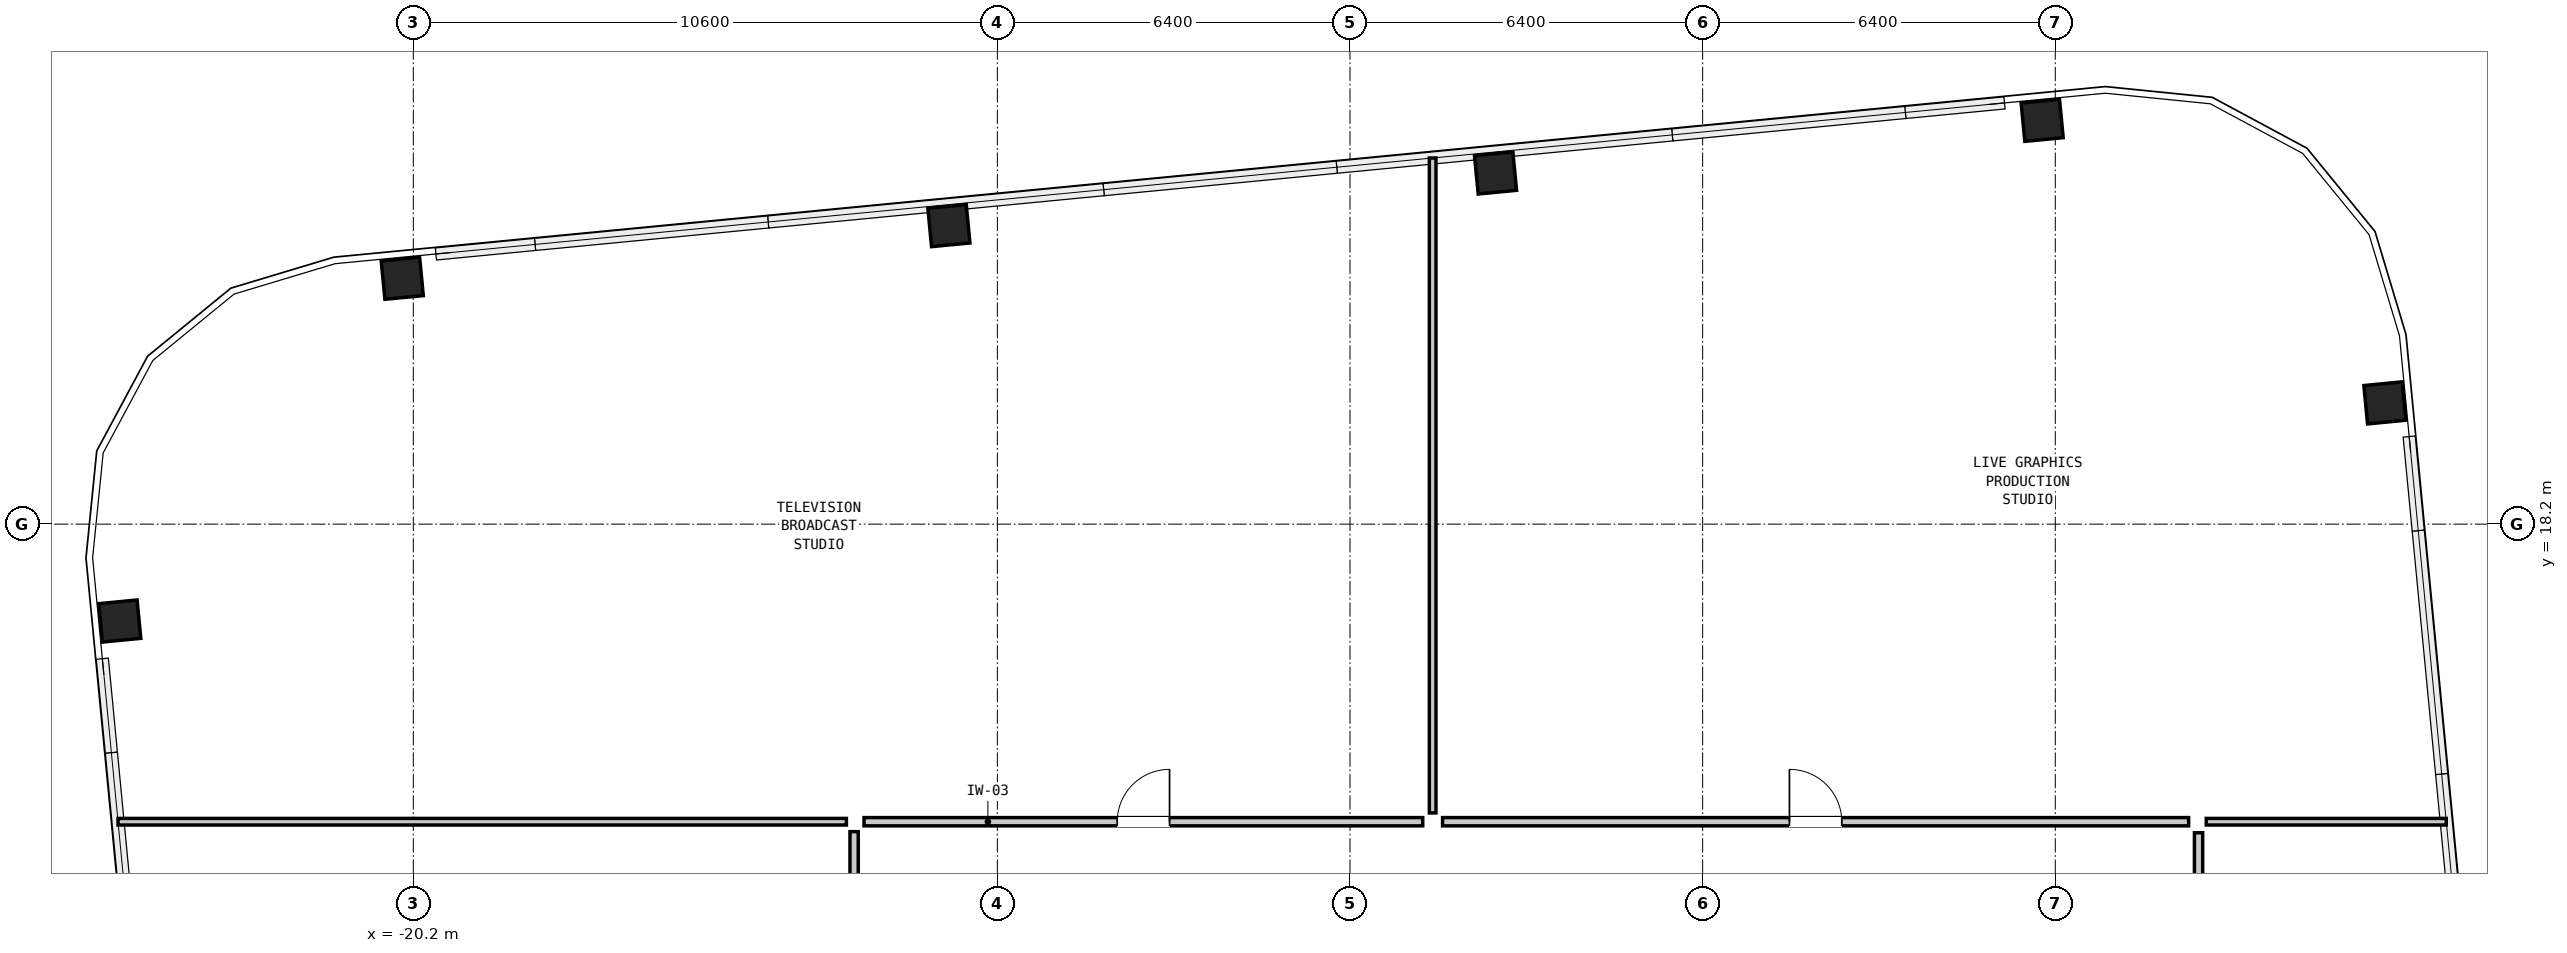
"""IFC4 building model, lengths in metres.
Left out: names, types, materials, properties, quantities, classifications, styles, units other than length and angle.
Written with IfcOpenShell. Run it as: python <this file> out.ifc"""

import sys

from ifc_helpers import new_model, si_unit, direction, frame, frame_2d, origin, origin_2d, place, context, subcontext, project, spatial, rectangle, hollow_rectangle, extrude, element, fill, save


model = new_model("IFC4")
c1 = context("Model", 3, precision=1e-05, world=origin(), true_north=direction((0.0, 1.0)))
c2 = subcontext(c1, "Body", "Model", "MODEL_VIEW")
j1 = project(units=[si_unit("LENGTHUNIT", "METRE"), si_unit("PLANEANGLEUNIT", "RADIAN")], contexts=[c1])
p1 = place(None, origin())
s1 = spatial("IfcSite", under=j1, at=p1, CompositionType="ELEMENT")
p2 = place(p1, origin())
s2 = spatial("IfcBuilding", under=s1, at=p2, CompositionType="ELEMENT")
p3 = place(p2, frame((0.0, 0.0, 159.2)))
s3 = spatial("IfcBuildingStorey", under=s2, at=p3, CompositionType="ELEMENT", Elevation=159.2)
for number, where, z_axis, x_axis in (
    (1, (15.582, 20.4, 0.0), (0.0, 0.0, 1.0), (-0.096, 0.995, 0.0)),
    (2, (9.362, 25.528, 0.0), (0.0, 0.0, 1.0), (0.995, 0.096, 0.0)),
    (3, (-0.559, 24.573, 0.0), (0.0, 0.0, 1.0), (0.995, 0.096, 0.0)),
    (4, (-10.479, 23.617, 0.0), (0.0, 0.0, 1.0), (0.995, 0.096, 0.0)),
    (5, (-20.4, 22.662, 0.0), (0.0, 0.0, 1.0), (0.995, 0.096, 0.0)),
    (6, (-25.528, 16.442, 0.0), (0.0, 0.0, 1.0), (-0.096, 0.995, 0.0)),
):
    element("IfcColumn", number, at=place(p3, frame(where, z_axis=z_axis, x_axis=x_axis)), inside=s3, PredefinedType="COLUMN", context=c2, shape_type="SweptSolid", body=[
        extrude(hollow_rectangle(XDim=0.7, YDim=0.7, WallThickness=0.045, at=origin_2d()), origin(), (0.0, 0.0, 1.0), 3.05),
    ])
p4 = place(p3, frame((-25.559, 12.8, 0.0), z_axis=(0.0, 0.0, 1.0), x_axis=(1.0, 0.0, 0.0)))
e7 = element("IfcWall", 7, at=p4, inside=s3, PredefinedType="PARTITIONING", context=c2, shape_type="SweptSolid", body=[
    extrude(rectangle(XDim=13.219, YDim=0.12, at=frame_2d((6.609, 0.0))), origin(), (0.0, 0.0, 1.0), 2.83),
])
p5 = place(p3, frame((12.34, 12.8, 0.0), z_axis=(0.0, 0.0, 1.0), x_axis=(1.0, 0.0, 0.0)))
e8 = element("IfcWall", 8, at=p5, inside=s3, PredefinedType="PARTITIONING", context=c2, shape_type="SweptSolid", body=[
    extrude(rectangle(XDim=4.355, YDim=0.12, at=frame_2d((2.178, 0.0))), origin(), (0.0, 0.0, 1.0), 2.83),
])
p6 = place(p3, frame((-1.7, 12.96, 0.0), z_axis=(0.0, 0.0, 1.0), x_axis=(0.0, 1.0, 0.0)))
e9 = element("IfcWall", 9, at=p6, inside=s3, PredefinedType="PARTITIONING", context=c2, shape_type="SweptSolid", body=[
    extrude(rectangle(XDim=11.885, YDim=0.12, at=frame_2d((5.942, 0.0))), origin(), (0.0, 0.0, 1.0), 2.83),
])
p7 = place(p3, frame((-12.02, 12.8, 0.0), z_axis=(0.0, 0.0, 1.0), x_axis=(1.0, 0.0, 0.0)))
e10 = element("IfcWall", 10, at=p7, inside=s3, PredefinedType="PARTITIONING", context=c2, shape_type="SweptSolid", body=[
    extrude(rectangle(XDim=10.14, YDim=0.15, at=frame_2d((5.07, 0.0))), origin(), (0.0, 0.0, 1.0), 2.83),
])
p8 = place(p7, frame((4.595, 0.0, 0.0)))
e11 = element("IfcOpeningElement", 11, at=p8, cuts=e10, PredefinedType="OPENING", context=c2, shape_type="SweptSolid", body=[
    extrude(rectangle(XDim=0.95, YDim=2.1, at=frame_2d((0.475, 1.05))), frame((0.0, 0.087, 0.0), z_axis=(0.0, -1.0, 0.0), x_axis=(1.0, 0.0, 0.0)), (0.0, 0.0, 1.0), 0.174),
])
p9 = place(p3, frame((-1.52, 12.8, 0.0), z_axis=(0.0, 0.0, 1.0), x_axis=(1.0, 0.0, 0.0)))
e12 = element("IfcWall", 12, at=p9, inside=s3, PredefinedType="PARTITIONING", context=c2, shape_type="SweptSolid", body=[
    extrude(rectangle(XDim=13.54, YDim=0.15, at=frame_2d((6.77, 0.0))), origin(), (0.0, 0.0, 1.0), 2.83),
])
p10 = place(p9, frame((6.295, 0.0, 0.0)))
e13 = element("IfcOpeningElement", 13, at=p10, cuts=e12, PredefinedType="OPENING", context=c2, shape_type="SweptSolid", body=[
    extrude(rectangle(XDim=0.95, YDim=2.1, at=frame_2d((0.475, 1.05))), frame((0.0, 0.087, 0.0), z_axis=(0.0, -1.0, 0.0), x_axis=(1.0, 0.0, 0.0)), (0.0, 0.0, 1.0), 0.174),
])
p11 = place(p3, frame((-12.2, -11.42, 0.0), z_axis=(0.0, 0.0, 1.0), x_axis=(0.0, 1.0, 0.0)))
e14 = element("IfcWall", 14, at=p11, inside=s3, PredefinedType="PARTITIONING", context=c2, shape_type="SweptSolid", body=[
    extrude(rectangle(XDim=24.04, YDim=0.15, at=frame_2d((12.02, 0.0))), origin(), (0.0, 0.0, 1.0), 2.83),
])
p12 = place(p11, frame((11.545, 0.0, 0.0)))
e15 = element("IfcOpeningElement", 15, at=p12, cuts=e14, PredefinedType="OPENING", context=c2, shape_type="SweptSolid", body=[
    extrude(rectangle(XDim=0.95, YDim=2.1, at=frame_2d((0.475, 1.05))), frame((0.0, 0.087, 0.0), z_axis=(0.0, -1.0, 0.0), x_axis=(1.0, 0.0, 0.0)), (0.0, 0.0, 1.0), 0.174),
])
p13 = place(p3, frame((12.2, 3.8, 0.0), z_axis=(0.0, 0.0, 1.0), x_axis=(0.0, 1.0, 0.0)))
e16 = element("IfcWall", 16, at=p13, inside=s3, PredefinedType="PARTITIONING", context=c2, shape_type="SweptSolid", body=[
    extrude(rectangle(XDim=8.8, YDim=0.15, at=frame_2d((4.4, 0.0))), origin(), (0.0, 0.0, 1.0), 2.83),
])
p14 = place(p13, frame((3.925, 0.0, 0.0)))
e17 = element("IfcOpeningElement", 17, at=p14, cuts=e16, PredefinedType="OPENING", context=c2, shape_type="SweptSolid", body=[
    extrude(rectangle(XDim=0.95, YDim=2.1, at=frame_2d((0.475, 1.05))), frame((0.0, 0.087, 0.0), z_axis=(0.0, -1.0, 0.0), x_axis=(1.0, 0.0, 0.0)), (0.0, 0.0, 1.0), 0.174),
])
p15 = place(p8, origin())
e18 = element("IfcDoor", 18, at=p15, inside=s3, OperationType="SINGLE_SWING_RIGHT", PredefinedType="DOOR", context=c2, shape_type="SweptSolid", body=[
    extrude(rectangle(XDim=0.95, YDim=2.1, at=frame_2d((0.475, 1.05))), frame((0.0, 0.025, 0.0), z_axis=(0.0, -1.0, 0.0), x_axis=(1.0, 0.0, 0.0)), (0.0, 0.0, 1.0), 0.05),
])
fill(e11, e18)
p16 = place(p10, origin())
e19 = element("IfcDoor", 19, at=p16, inside=s3, OperationType="SINGLE_SWING_LEFT", PredefinedType="DOOR", context=c2, shape_type="SweptSolid", body=[
    extrude(rectangle(XDim=0.95, YDim=2.1, at=frame_2d((0.475, 1.05))), frame((0.0, 0.025, 0.0), z_axis=(0.0, -1.0, 0.0), x_axis=(1.0, 0.0, 0.0)), (0.0, 0.0, 1.0), 0.05),
])
fill(e13, e19)
save(model, sys.argv[1])
